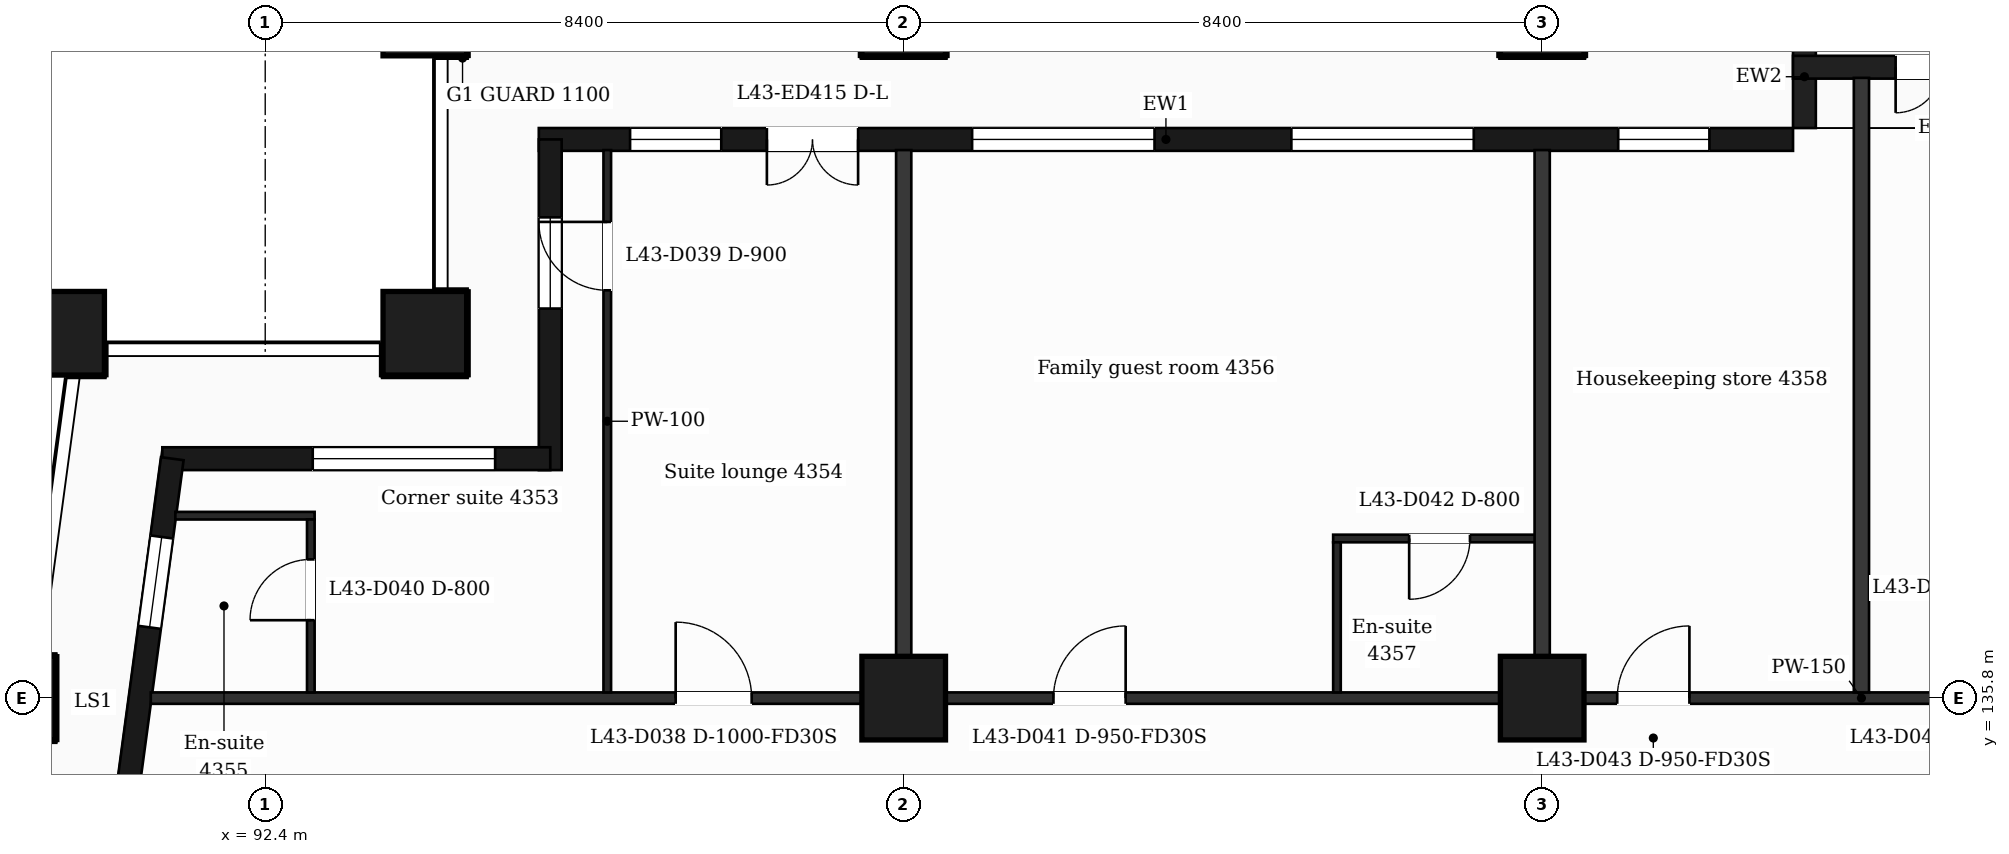
"""IFC4 building model, lengths in metres.
Left out: names, types, materials, properties, quantities, classifications, styles, units other than length and angle.
Written with IfcOpenShell. Run it as: python <this file> out.ifc"""

import sys

from ifc_helpers import new_model, si_unit, direction, frame, frame_2d, origin, origin_2d, place, context, subcontext, project, spatial, rectangle, extrude, element, fill, save


model = new_model("IFC4")
c1 = context("Model", 3, precision=1e-05, world=origin(), true_north=direction((0.0, 1.0)))
c2 = subcontext(c1, "Body", "Model", "MODEL_VIEW")
j1 = project(units=[si_unit("LENGTHUNIT", "METRE"), si_unit("PLANEANGLEUNIT", "RADIAN")], contexts=[c1])
p1 = place(None, origin())
s1 = spatial("IfcSite", under=j1, at=p1, CompositionType="ELEMENT")
p2 = place(p1, origin())
s2 = spatial("IfcBuilding", under=s1, at=p2, CompositionType="ELEMENT")
p3 = place(p2, frame((0.0, 0.0, 181.1)))
s3 = spatial("IfcBuildingStorey", under=s2, at=p3, CompositionType="ELEMENT", Elevation=181.1)
for number, where, z_axis, x_axis in (
    (1, (94.5, 140.6, 0.0), (0.0, 0.0, 1.0), (1.0, 0.0, 0.0)),
    (2, (89.735, 140.6, 0.0), (0.0, 0.0, 1.0), (1.0, 0.0, 0.0)),
    (3, (100.8, 135.8, 0.0), (0.0, 0.0, 1.0), (1.0, 0.0, 0.0)),
    (4, (109.2, 135.8, 0.0), (0.0, 0.0, 1.0), (1.0, 0.0, 0.0)),
    (5, (89.088, 135.8, 0.0), (0.0, 0.0, 1.0), (1.0, 0.0, 0.0)),
    (6, (100.8, 144.8, 0.0), (0.0, 0.0, 1.0), (1.0, 0.0, 0.0)),
    (7, (109.2, 144.8, 0.0), (0.0, 0.0, 1.0), (1.0, 0.0, 0.0)),
    (8, (94.5, 144.8, 0.0), (0.0, 0.0, 1.0), (1.0, 0.0, 0.0)),
):
    element("IfcColumn", number, at=place(p3, frame(where, z_axis=z_axis, x_axis=x_axis)), inside=s3, PredefinedType="COLUMN", context=c2, shape_type="SweptSolid", body=[
        extrude(rectangle(XDim=1.1, YDim=1.1, at=origin_2d()), origin(), (0.0, 0.0, 1.0), 3.7),
    ])
p4 = place(p3, frame((112.5, 143.15, 0.0), z_axis=(0.0, 0.0, 1.0), x_axis=(-1.0, 0.0, 0.0)))
e9 = element("IfcWall", 9, at=p4, inside=s3, PredefinedType="SOLIDWALL", context=c2, shape_type="SweptSolid", body=[
    extrude(rectangle(XDim=16.5, YDim=0.3, at=frame_2d((8.25, 0.0))), origin(), (0.0, 0.0, 1.0), 3.38),
])
p5 = place(p4, frame((1.1, 0.0, 0.9)))
e10 = element("IfcOpeningElement", 10, at=p5, cuts=e9, PredefinedType="OPENING", context=c2, shape_type="SweptSolid", body=[
    extrude(rectangle(XDim=1.2, YDim=2.1, at=frame_2d((0.6, 1.05))), frame((0.0, 0.16, 0.0), z_axis=(0.0, -1.0, 0.0), x_axis=(1.0, 0.0, 0.0)), (0.0, 0.0, 1.0), 0.32),
])
p6 = place(p4, frame((4.2, 0.0, 0.9)))
e11 = element("IfcOpeningElement", 11, at=p6, cuts=e9, PredefinedType="OPENING", context=c2, shape_type="SweptSolid", body=[
    extrude(rectangle(XDim=2.4, YDim=2.1, at=frame_2d((1.2, 1.05))), frame((0.0, 0.16, 0.0), z_axis=(0.0, -1.0, 0.0), x_axis=(1.0, 0.0, 0.0)), (0.0, 0.0, 1.0), 0.32),
])
p7 = place(p4, frame((8.4, 0.0, 0.9)))
e12 = element("IfcOpeningElement", 12, at=p7, cuts=e9, PredefinedType="OPENING", context=c2, shape_type="SweptSolid", body=[
    extrude(rectangle(XDim=2.4, YDim=2.1, at=frame_2d((1.2, 1.05))), frame((0.0, 0.16, 0.0), z_axis=(0.0, -1.0, 0.0), x_axis=(1.0, 0.0, 0.0)), (0.0, 0.0, 1.0), 0.32),
])
p8 = place(p4, frame((12.3, 0.0, 0.0)))
e13 = element("IfcOpeningElement", 13, at=p8, cuts=e9, PredefinedType="OPENING", context=c2, shape_type="SweptSolid", body=[
    extrude(rectangle(XDim=1.2, YDim=2.4, at=frame_2d((0.6, 1.2))), frame((0.0, 0.16, 0.0), z_axis=(0.0, -1.0, 0.0), x_axis=(1.0, 0.0, 0.0)), (0.0, 0.0, 1.0), 0.32),
])
p9 = place(p4, frame((14.1, 0.0, 0.9)))
e14 = element("IfcOpeningElement", 14, at=p9, cuts=e9, PredefinedType="OPENING", context=c2, shape_type="SweptSolid", body=[
    extrude(rectangle(XDim=1.2, YDim=2.1, at=frame_2d((0.6, 1.05))), frame((0.0, 0.16, 0.0), z_axis=(0.0, -1.0, 0.0), x_axis=(1.0, 0.0, 0.0)), (0.0, 0.0, 1.0), 0.32),
])
p10 = place(p3, frame((112.65, 143.3, 0.0), z_axis=(0.0, 0.0, 1.0), x_axis=(0.0, 1.0, 0.0)))
e15 = element("IfcWall", 15, at=p10, inside=s3, PredefinedType="SOLIDWALL", context=c2, shape_type="SweptSolid", body=[
    extrude(rectangle(XDim=1.35, YDim=0.3, at=frame_2d((0.675, 0.0))), origin(), (0.0, 0.0, 1.0), 3.38),
])
p11 = place(p3, frame((116.4, 144.1, 0.0), z_axis=(0.0, 0.0, 1.0), x_axis=(-1.0, 0.0, 0.0)))
e16 = element("IfcWall", 16, at=p11, inside=s3, PredefinedType="SOLIDWALL", context=c2, shape_type="SweptSolid", body=[
    extrude(rectangle(XDim=3.9, YDim=0.3, at=frame_2d((1.95, 0.0))), origin(), (0.0, 0.0, 1.0), 3.38),
])
p12 = place(p11, frame((1.35, 0.0, 0.0)))
e17 = element("IfcOpeningElement", 17, at=p12, cuts=e16, PredefinedType="OPENING", context=c2, shape_type="SweptSolid", body=[
    extrude(rectangle(XDim=1.2, YDim=2.4, at=frame_2d((0.6, 1.2))), frame((0.0, 0.16, 0.0), z_axis=(0.0, -1.0, 0.0), x_axis=(1.0, 0.0, 0.0)), (0.0, 0.0, 1.0), 0.32),
])
p13 = place(p3, frame((96.15, 143.15, 0.0), z_axis=(0.0, 0.0, 1.0), x_axis=(0.0, -1.0, 0.0)))
e18 = element("IfcWall", 18, at=p13, inside=s3, PredefinedType="SOLIDWALL", context=c2, shape_type="SweptSolid", body=[
    extrude(rectangle(XDim=4.35, YDim=0.3, at=frame_2d((2.175, 0.0))), origin(), (0.0, 0.0, 1.0), 3.38),
])
p14 = place(p13, frame((1.025, 0.0, 0.9)))
e19 = element("IfcOpeningElement", 19, at=p14, cuts=e18, PredefinedType="OPENING", context=c2, shape_type="SweptSolid", body=[
    extrude(rectangle(XDim=1.2, YDim=2.1, at=frame_2d((0.6, 1.05))), frame((0.0, 0.16, 0.0), z_axis=(0.0, -1.0, 0.0), x_axis=(1.0, 0.0, 0.0)), (0.0, 0.0, 1.0), 0.32),
])
p15 = place(p3, frame((96.15, 138.95, 0.0), z_axis=(0.0, 0.0, 1.0), x_axis=(-1.0, 0.0, 0.0)))
e20 = element("IfcWall", 20, at=p15, inside=s3, PredefinedType="SOLIDWALL", context=c2, shape_type="SweptSolid", body=[
    extrude(rectangle(XDim=5.104, YDim=0.3, at=frame_2d((2.552, 0.0))), origin(), (0.0, 0.0, 1.0), 3.38),
])
p16 = place(p15, frame((0.725, 0.0, 0.9)))
e21 = element("IfcOpeningElement", 21, at=p16, cuts=e20, PredefinedType="OPENING", context=c2, shape_type="SweptSolid", body=[
    extrude(rectangle(XDim=2.4, YDim=2.1, at=frame_2d((1.2, 1.05))), frame((0.0, 0.16, 0.0), z_axis=(0.0, -1.0, 0.0), x_axis=(1.0, 0.0, 0.0)), (0.0, 0.0, 1.0), 0.32),
])
p17 = place(p3, frame((91.177, 138.95, 0.0), z_axis=(0.0, 0.0, 1.0), x_axis=(-0.133426664613, -0.991058689065, 0.0)))
e22 = element("IfcWall", 22, at=p17, inside=s3, PredefinedType="SOLIDWALL", context=c2, shape_type="SweptSolid", body=[
    extrude(rectangle(XDim=6.609, YDim=0.3, at=frame_2d((3.305, 0.0))), origin(), (0.0, 0.0, 1.0), 3.38),
])
p18 = place(p17, frame((1.039, 0.0, 0.9)))
e23 = element("IfcOpeningElement", 23, at=p18, cuts=e22, PredefinedType="OPENING", context=c2, shape_type="SweptSolid", body=[
    extrude(rectangle(XDim=1.2, YDim=2.1, at=frame_2d((0.6, 1.05))), frame((0.0, 0.16, 0.0), z_axis=(0.0, -1.0, 0.0), x_axis=(1.0, 0.0, 0.0)), (0.0, 0.0, 1.0), 0.32),
])
p19 = place(p17, frame((4.294, 0.0, 0.0)))
e24 = element("IfcOpeningElement", 24, at=p19, cuts=e22, PredefinedType="OPENING", context=c2, shape_type="SweptSolid", body=[
    extrude(rectangle(XDim=1.2, YDim=2.4, at=frame_2d((0.6, 1.2))), frame((0.0, 0.16, 0.0), z_axis=(0.0, -1.0, 0.0), x_axis=(1.0, 0.0, 0.0)), (0.0, 0.0, 1.0), 0.32),
])
p20 = place(p3, frame((90.895, 135.8, 0.0), z_axis=(0.0, 0.0, 1.0), x_axis=(1.0, 0.0, 0.0)))
e25 = element("IfcWall", 25, at=p20, inside=s3, PredefinedType="PARTITIONING", context=c2, shape_type="SweptSolid", body=[
    extrude(rectangle(XDim=45.011, YDim=0.15, at=frame_2d((22.505, 0.0))), origin(), (0.0, 0.0, 1.0), 3.38),
])
p21 = place(p20, frame((6.906, 0.0, 0.0)))
e26 = element("IfcOpeningElement", 26, at=p21, cuts=e25, PredefinedType="OPENING", context=c2, shape_type="SweptSolid", body=[
    extrude(rectangle(XDim=1.0, YDim=2.1, at=frame_2d((0.5, 1.05))), frame((0.0, 0.085, 0.0), z_axis=(0.0, -1.0, 0.0), x_axis=(1.0, 0.0, 0.0)), (0.0, 0.0, 1.0), 0.17),
])
p22 = place(p20, frame((11.875, 0.0, 0.0)))
e27 = element("IfcOpeningElement", 27, at=p22, cuts=e25, PredefinedType="OPENING", context=c2, shape_type="SweptSolid", body=[
    extrude(rectangle(XDim=0.95, YDim=2.1, at=frame_2d((0.475, 1.05))), frame((0.0, 0.085, 0.0), z_axis=(0.0, -1.0, 0.0), x_axis=(1.0, 0.0, 0.0)), (0.0, 0.0, 1.0), 0.17),
])
p23 = place(p20, frame((19.292, 0.0, 0.0)))
e28 = element("IfcOpeningElement", 28, at=p23, cuts=e25, PredefinedType="OPENING", context=c2, shape_type="SweptSolid", body=[
    extrude(rectangle(XDim=0.95, YDim=2.1, at=frame_2d((0.475, 1.05))), frame((0.0, 0.085, 0.0), z_axis=(0.0, -1.0, 0.0), x_axis=(1.0, 0.0, 0.0)), (0.0, 0.0, 1.0), 0.17),
])
p24 = place(p20, frame((23.418, 0.0, 0.0)))
e29 = element("IfcOpeningElement", 29, at=p24, cuts=e25, PredefinedType="OPENING", context=c2, shape_type="SweptSolid", body=[
    extrude(rectangle(XDim=0.95, YDim=2.1, at=frame_2d((0.475, 1.05))), frame((0.0, 0.085, 0.0), z_axis=(0.0, -1.0, 0.0), x_axis=(1.0, 0.0, 0.0)), (0.0, 0.0, 1.0), 0.17),
])
p25 = place(p20, frame((29.425, 0.0, 0.0)))
e30 = element("IfcOpeningElement", 30, at=p25, cuts=e25, PredefinedType="OPENING", context=c2, shape_type="SweptSolid", body=[
    extrude(rectangle(XDim=0.95, YDim=2.1, at=frame_2d((0.475, 1.05))), frame((0.0, 0.085, 0.0), z_axis=(0.0, -1.0, 0.0), x_axis=(1.0, 0.0, 0.0)), (0.0, 0.0, 1.0), 0.17),
])
p26 = place(p20, frame((31.63, 0.0, 0.0)))
e31 = element("IfcOpeningElement", 31, at=p26, cuts=e25, PredefinedType="OPENING", context=c2, shape_type="SweptSolid", body=[
    extrude(rectangle(XDim=0.95, YDim=2.1, at=frame_2d((0.475, 1.05))), frame((0.0, 0.085, 0.0), z_axis=(0.0, -1.0, 0.0), x_axis=(1.0, 0.0, 0.0)), (0.0, 0.0, 1.0), 0.17),
])
p27 = place(p20, frame((36.775, 0.0, 0.0)))
e32 = element("IfcOpeningElement", 32, at=p27, cuts=e25, PredefinedType="OPENING", context=c2, shape_type="SweptSolid", body=[
    extrude(rectangle(XDim=1.0, YDim=2.1, at=frame_2d((0.5, 1.05))), frame((0.0, 0.085, 0.0), z_axis=(0.0, -1.0, 0.0), x_axis=(1.0, 0.0, 0.0)), (0.0, 0.0, 1.0), 0.17),
])
p28 = place(p3, frame((106.45, 137.9, 0.0), z_axis=(0.0, 0.0, 1.0), x_axis=(1.0, 0.0, 0.0)))
e33 = element("IfcWall", 33, at=p28, inside=s3, PredefinedType="PARTITIONING", context=c2, shape_type="SweptSolid", body=[
    extrude(rectangle(XDim=2.75, YDim=0.1, at=frame_2d((1.375, 0.0))), origin(), (0.0, 0.0, 1.0), 3.38),
])
p29 = place(p28, frame((1.0, 0.0, 0.0)))
e34 = element("IfcOpeningElement", 34, at=p29, cuts=e33, PredefinedType="OPENING", context=c2, shape_type="SweptSolid", body=[
    extrude(rectangle(XDim=0.8, YDim=2.1, at=frame_2d((0.4, 1.05))), frame((0.0, 0.06, 0.0), z_axis=(0.0, -1.0, 0.0), x_axis=(1.0, 0.0, 0.0)), (0.0, 0.0, 1.0), 0.12),
])
p30 = place(p3, frame((91.218, 138.2, 0.0), z_axis=(0.0, 0.0, 1.0), x_axis=(1.0, 0.0, 0.0)))
e35 = element("IfcWall", 35, at=p30, inside=s3, PredefinedType="PARTITIONING", context=c2, shape_type="SweptSolid", body=[
    extrude(rectangle(XDim=1.832, YDim=0.1, at=frame_2d((0.916, 0.0))), origin(), (0.0, 0.0, 1.0), 3.38),
])
p31 = place(p3, frame((93.0, 135.875, 0.0), z_axis=(0.0, 0.0, 1.0), x_axis=(0.0, 1.0, 0.0)))
e36 = element("IfcWall", 36, at=p31, inside=s3, PredefinedType="PARTITIONING", context=c2, shape_type="SweptSolid", body=[
    extrude(rectangle(XDim=2.275, YDim=0.1, at=frame_2d((1.137, 0.0))), origin(), (0.0, 0.0, 1.0), 3.38),
])
p32 = place(p31, frame((0.95, 0.0, 0.0)))
e37 = element("IfcOpeningElement", 37, at=p32, cuts=e36, PredefinedType="OPENING", context=c2, shape_type="SweptSolid", body=[
    extrude(rectangle(XDim=0.8, YDim=2.1, at=frame_2d((0.4, 1.05))), frame((0.0, 0.06, 0.0), z_axis=(0.0, -1.0, 0.0), x_axis=(1.0, 0.0, 0.0)), (0.0, 0.0, 1.0), 0.12),
])
p33 = place(p3, frame((96.9, 135.875, 0.0), z_axis=(0.0, 0.0, 1.0), x_axis=(0.0, 1.0, 0.0)))
e38 = element("IfcWall", 38, at=p33, inside=s3, PredefinedType="PARTITIONING", context=c2, shape_type="SweptSolid", body=[
    extrude(rectangle(XDim=7.135, YDim=0.1, at=frame_2d((3.567, 0.0))), origin(), (0.0, 0.0, 1.0), 3.38),
])
p34 = place(p33, frame((5.29, 0.0, 0.0)))
e39 = element("IfcOpeningElement", 39, at=p34, cuts=e38, PredefinedType="OPENING", context=c2, shape_type="SweptSolid", body=[
    extrude(rectangle(XDim=0.9, YDim=2.1, at=frame_2d((0.45, 1.05))), frame((0.0, 0.06, 0.0), z_axis=(0.0, -1.0, 0.0), x_axis=(1.0, 0.0, 0.0)), (0.0, 0.0, 1.0), 0.12),
])
p35 = place(p3, frame((100.8, 135.875, 0.0), z_axis=(0.0, 0.0, 1.0), x_axis=(0.0, 1.0, 0.0)))
e40 = element("IfcWall", 40, at=p35, inside=s3, PredefinedType="PARTITIONING", context=c2, shape_type="SweptSolid", body=[
    extrude(rectangle(XDim=7.135, YDim=0.2, at=frame_2d((3.567, 0.0))), origin(), (0.0, 0.0, 1.0), 3.38),
])
p36 = place(p3, frame((106.5, 135.875, 0.0), z_axis=(0.0, 0.0, 1.0), x_axis=(0.0, 1.0, 0.0)))
e41 = element("IfcWall", 41, at=p36, inside=s3, PredefinedType="PARTITIONING", context=c2, shape_type="SweptSolid", body=[
    extrude(rectangle(XDim=1.975, YDim=0.1, at=frame_2d((0.988, 0.0))), origin(), (0.0, 0.0, 1.0), 3.38),
])
p37 = place(p3, frame((109.2, 135.875, 0.0), z_axis=(0.0, 0.0, 1.0), x_axis=(0.0, 1.0, 0.0)))
e42 = element("IfcWall", 42, at=p37, inside=s3, PredefinedType="PARTITIONING", context=c2, shape_type="SweptSolid", body=[
    extrude(rectangle(XDim=7.135, YDim=0.2, at=frame_2d((3.567, 0.0))), origin(), (0.0, 0.0, 1.0), 3.38),
])
p38 = place(p3, frame((113.4, 135.875, 0.0), z_axis=(0.0, 0.0, 1.0), x_axis=(0.0, 1.0, 0.0)))
e43 = element("IfcWall", 43, at=p38, inside=s3, PredefinedType="PARTITIONING", context=c2, shape_type="SweptSolid", body=[
    extrude(rectangle(XDim=8.085, YDim=0.2, at=frame_2d((4.042, 0.0))), origin(), (0.0, 0.0, 1.0), 3.38),
])
p39 = place(p5, origin())
e44 = element("IfcWindow", 44, at=p39, inside=s3, PartitioningType="SINGLE_PANEL", PredefinedType="WINDOW", context=c2, shape_type="SweptSolid", body=[
    extrude(rectangle(XDim=1.2, YDim=2.1, at=frame_2d((0.6, 1.05))), frame((0.0, 0.03, 0.0), z_axis=(0.0, -1.0, 0.0), x_axis=(1.0, 0.0, 0.0)), (0.0, 0.0, 1.0), 0.06),
])
fill(e10, e44)
p40 = place(p6, origin())
e45 = element("IfcWindow", 45, at=p40, inside=s3, PartitioningType="SINGLE_PANEL", PredefinedType="WINDOW", context=c2, shape_type="SweptSolid", body=[
    extrude(rectangle(XDim=2.4, YDim=2.1, at=frame_2d((1.2, 1.05))), frame((0.0, 0.03, 0.0), z_axis=(0.0, -1.0, 0.0), x_axis=(1.0, 0.0, 0.0)), (0.0, 0.0, 1.0), 0.06),
])
fill(e11, e45)
p41 = place(p7, origin())
e46 = element("IfcWindow", 46, at=p41, inside=s3, PartitioningType="SINGLE_PANEL", PredefinedType="WINDOW", context=c2, shape_type="SweptSolid", body=[
    extrude(rectangle(XDim=2.4, YDim=2.1, at=frame_2d((1.2, 1.05))), frame((0.0, 0.03, 0.0), z_axis=(0.0, -1.0, 0.0), x_axis=(1.0, 0.0, 0.0)), (0.0, 0.0, 1.0), 0.06),
])
fill(e12, e46)
p42 = place(p8, origin())
e47 = element("IfcDoor", 47, at=p42, inside=s3, OperationType="DOUBLE_DOOR_SINGLE_SWING", PredefinedType="DOOR", context=c2, shape_type="SweptSolid", body=[
    extrude(rectangle(XDim=1.2, YDim=2.4, at=frame_2d((0.6, 1.2))), frame((0.0, 0.025, 0.0), z_axis=(0.0, -1.0, 0.0), x_axis=(1.0, 0.0, 0.0)), (0.0, 0.0, 1.0), 0.05),
])
fill(e13, e47)
p43 = place(p9, origin())
e48 = element("IfcWindow", 48, at=p43, inside=s3, PartitioningType="SINGLE_PANEL", PredefinedType="WINDOW", context=c2, shape_type="SweptSolid", body=[
    extrude(rectangle(XDim=1.2, YDim=2.1, at=frame_2d((0.6, 1.05))), frame((0.0, 0.03, 0.0), z_axis=(0.0, -1.0, 0.0), x_axis=(1.0, 0.0, 0.0)), (0.0, 0.0, 1.0), 0.06),
])
fill(e14, e48)
p44 = place(p12, origin())
e49 = element("IfcDoor", 49, at=p44, inside=s3, OperationType="DOUBLE_DOOR_SINGLE_SWING", PredefinedType="DOOR", context=c2, shape_type="SweptSolid", body=[
    extrude(rectangle(XDim=1.2, YDim=2.4, at=frame_2d((0.6, 1.2))), frame((0.0, 0.025, 0.0), z_axis=(0.0, -1.0, 0.0), x_axis=(1.0, 0.0, 0.0)), (0.0, 0.0, 1.0), 0.05),
])
fill(e17, e49)
p45 = place(p14, origin())
e50 = element("IfcWindow", 50, at=p45, inside=s3, PartitioningType="SINGLE_PANEL", PredefinedType="WINDOW", context=c2, shape_type="SweptSolid", body=[
    extrude(rectangle(XDim=1.2, YDim=2.1, at=frame_2d((0.6, 1.05))), frame((0.0, 0.03, 0.0), z_axis=(0.0, -1.0, 0.0), x_axis=(1.0, 0.0, 0.0)), (0.0, 0.0, 1.0), 0.06),
])
fill(e19, e50)
p46 = place(p16, origin())
e51 = element("IfcWindow", 51, at=p46, inside=s3, PartitioningType="SINGLE_PANEL", PredefinedType="WINDOW", context=c2, shape_type="SweptSolid", body=[
    extrude(rectangle(XDim=2.4, YDim=2.1, at=frame_2d((1.2, 1.05))), frame((0.0, 0.03, 0.0), z_axis=(0.0, -1.0, 0.0), x_axis=(1.0, 0.0, 0.0)), (0.0, 0.0, 1.0), 0.06),
])
fill(e21, e51)
p47 = place(p18, origin())
e52 = element("IfcWindow", 52, at=p47, inside=s3, PartitioningType="SINGLE_PANEL", PredefinedType="WINDOW", context=c2, shape_type="SweptSolid", body=[
    extrude(rectangle(XDim=1.2, YDim=2.1, at=frame_2d((0.6, 1.05))), frame((0.0, 0.03, 0.0), z_axis=(0.0, -1.0, 0.0), x_axis=(1.0, 0.0, 0.0)), (0.0, 0.0, 1.0), 0.06),
])
fill(e23, e52)
p48 = place(p21, origin())
e53 = element("IfcDoor", 53, at=p48, inside=s3, OperationType="SINGLE_SWING_LEFT", PredefinedType="DOOR", context=c2, shape_type="SweptSolid", body=[
    extrude(rectangle(XDim=1.0, YDim=2.1, at=frame_2d((0.5, 1.05))), frame((0.0, 0.025, 0.0), z_axis=(0.0, -1.0, 0.0), x_axis=(1.0, 0.0, 0.0)), (0.0, 0.0, 1.0), 0.05),
])
fill(e26, e53)
p49 = place(p34, origin())
e54 = element("IfcDoor", 54, at=p49, inside=s3, OperationType="SINGLE_SWING_RIGHT", PredefinedType="DOOR", context=c2, shape_type="SweptSolid", body=[
    extrude(rectangle(XDim=0.9, YDim=2.1, at=frame_2d((0.45, 1.05))), frame((0.0, 0.025, 0.0), z_axis=(0.0, -1.0, 0.0), x_axis=(1.0, 0.0, 0.0)), (0.0, 0.0, 1.0), 0.05),
])
fill(e39, e54)
p50 = place(p32, origin())
e55 = element("IfcDoor", 55, at=p50, inside=s3, OperationType="SINGLE_SWING_LEFT", PredefinedType="DOOR", context=c2, shape_type="SweptSolid", body=[
    extrude(rectangle(XDim=0.8, YDim=2.1, at=frame_2d((0.4, 1.05))), frame((0.0, 0.025, 0.0), z_axis=(0.0, -1.0, 0.0), x_axis=(1.0, 0.0, 0.0)), (0.0, 0.0, 1.0), 0.05),
])
fill(e37, e55)
p51 = place(p22, origin())
e56 = element("IfcDoor", 56, at=p51, inside=s3, OperationType="SINGLE_SWING_RIGHT", PredefinedType="DOOR", context=c2, shape_type="SweptSolid", body=[
    extrude(rectangle(XDim=0.95, YDim=2.1, at=frame_2d((0.475, 1.05))), frame((0.0, 0.025, 0.0), z_axis=(0.0, -1.0, 0.0), x_axis=(1.0, 0.0, 0.0)), (0.0, 0.0, 1.0), 0.05),
])
fill(e27, e56)
p52 = place(p29, origin())
e57 = element("IfcDoor", 57, at=p52, inside=s3, OperationType="SINGLE_SWING_LEFT", PredefinedType="DOOR", context=c2, shape_type="SweptSolid", body=[
    extrude(rectangle(XDim=0.8, YDim=2.1, at=frame_2d((0.4, 1.05))), frame((0.0, 0.025, 0.0), z_axis=(0.0, -1.0, 0.0), x_axis=(1.0, 0.0, 0.0)), (0.0, 0.0, 1.0), 0.05),
])
fill(e34, e57)
p53 = place(p23, origin())
e58 = element("IfcDoor", 58, at=p53, inside=s3, OperationType="SINGLE_SWING_RIGHT", PredefinedType="DOOR", context=c2, shape_type="SweptSolid", body=[
    extrude(rectangle(XDim=0.95, YDim=2.1, at=frame_2d((0.475, 1.05))), frame((0.0, 0.025, 0.0), z_axis=(0.0, -1.0, 0.0), x_axis=(1.0, 0.0, 0.0)), (0.0, 0.0, 1.0), 0.05),
])
fill(e28, e58)
save(model, sys.argv[1])
